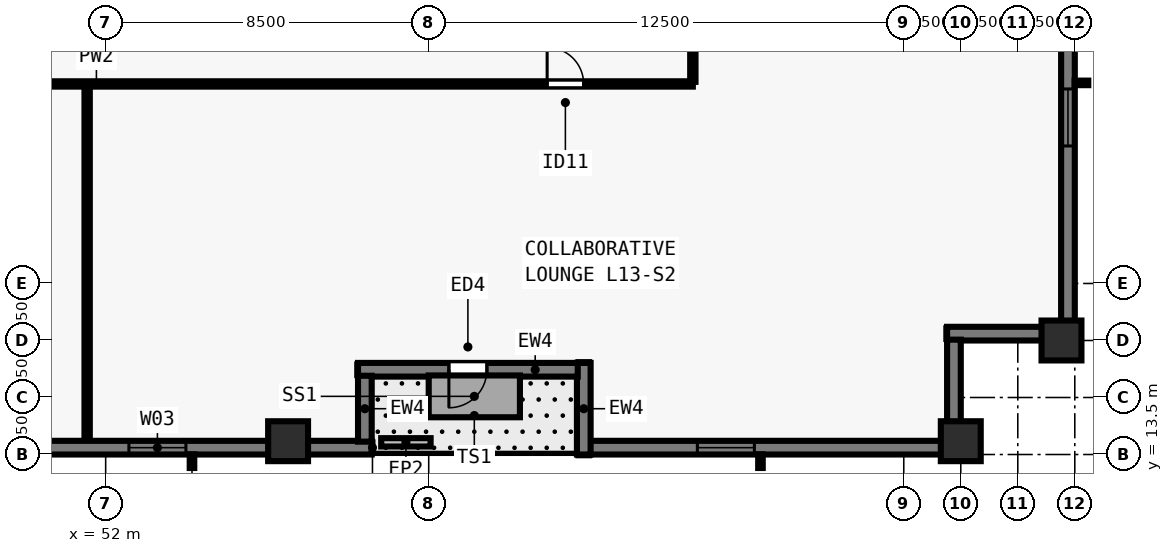
"""IFC4 building model, lengths in metres.
Left out: names, types, materials, properties, quantities, classifications, styles, units other than length and angle.
Written with IfcOpenShell. Run it as: python <this file> out.ifc"""

import sys

from ifc_helpers import new_model, si_unit, direction, frame, frame_2d, origin, origin_2d, place, context, subcontext, project, spatial, rectangle, extrude, element, fill, save


model = new_model("IFC4")
c1 = context("Model", 3, precision=1e-05, world=origin(), true_north=direction((0.0, 1.0)))
c2 = subcontext(c1, "Body", "Model", "MODEL_VIEW")
j1 = project(units=[si_unit("LENGTHUNIT", "METRE"), si_unit("PLANEANGLEUNIT", "RADIAN")], contexts=[c1])
p1 = place(None, origin())
s1 = spatial("IfcSite", under=j1, at=p1, CompositionType="ELEMENT")
p2 = place(p1, origin())
s2 = spatial("IfcBuilding", under=s1, at=p2, CompositionType="ELEMENT")
p3 = place(p2, frame((0.0, 0.0, 51.5)))
s3 = spatial("IfcBuildingStorey", under=s2, at=p3, CompositionType="ELEMENT", Elevation=51.5)
for number, where, z_axis, x_axis in (
    (1, (56.8, 13.85, 0.0), (0.0, 0.0, 1.0), (1.0, 0.0, 0.0)),
    (2, (74.5, 13.85, 0.0), (0.0, 0.0, 1.0), (1.0, 0.0, 0.0)),
    (3, (77.15, 16.5, 0.0), (0.0, 0.0, 1.0), (0.0, 1.0, 0.0)),
):
    element("IfcColumn", number, at=place(p3, frame(where, z_axis=z_axis, x_axis=x_axis)), inside=s3, PredefinedType="COLUMN", context=c2, shape_type="SweptSolid", body=[
        extrude(rectangle(XDim=1.05, YDim=1.05, at=origin_2d()), origin(), (0.0, 0.0, 1.0), 3.5),
    ])
p4 = place(p3, frame((59.0, 13.68, 0.0), z_axis=(0.0, 0.0, 1.0), x_axis=(-1.0, 0.0, 0.0)))
e4 = element("IfcWall", 4, at=p4, inside=s3, PredefinedType="SOLIDWALL", context=c2, shape_type="SweptSolid", body=[
    extrude(rectangle(XDim=29.162, YDim=0.36, at=frame_2d((14.581, 0.0))), origin(), (0.0, 0.0, 1.0), 3.28),
])
p5 = place(p4, frame((4.888, 0.0, 0.8)))
e5 = element("IfcOpeningElement", 5, at=p5, cuts=e4, PredefinedType="OPENING", context=c2, shape_type="SweptSolid", body=[
    extrude(rectangle(XDim=1.5, YDim=1.544, at=frame_2d((0.75, 0.772))), frame((0.0, 0.19, 0.0), z_axis=(0.0, -1.0, 0.0), x_axis=(1.0, 0.0, 0.0)), (0.0, 0.0, 1.0), 0.38),
])
p6 = place(p4, frame((8.615, 0.0, 0.8)))
e6 = element("IfcOpeningElement", 6, at=p6, cuts=e4, PredefinedType="OPENING", context=c2, shape_type="SweptSolid", body=[
    extrude(rectangle(XDim=1.2, YDim=1.544, at=frame_2d((0.6, 0.772))), frame((0.0, 0.19, 0.0), z_axis=(0.0, -1.0, 0.0), x_axis=(1.0, 0.0, 0.0)), (0.0, 0.0, 1.0), 0.38),
])
p7 = place(p4, frame((12.893, 0.0, 0.8)))
e7 = element("IfcOpeningElement", 7, at=p7, cuts=e4, PredefinedType="OPENING", context=c2, shape_type="SweptSolid", body=[
    extrude(rectangle(XDim=1.5, YDim=1.544, at=frame_2d((0.75, 0.772))), frame((0.0, 0.19, 0.0), z_axis=(0.0, -1.0, 0.0), x_axis=(1.0, 0.0, 0.0)), (0.0, 0.0, 1.0), 0.38),
])
p8 = place(p4, frame((15.77, 0.0, 0.8)))
e8 = element("IfcOpeningElement", 8, at=p8, cuts=e4, PredefinedType="OPENING", context=c2, shape_type="SweptSolid", body=[
    extrude(rectangle(XDim=1.2, YDim=1.544, at=frame_2d((0.6, 0.772))), frame((0.0, 0.19, 0.0), z_axis=(0.0, -1.0, 0.0), x_axis=(1.0, 0.0, 0.0)), (0.0, 0.0, 1.0), 0.38),
])
p9 = place(p4, frame((19.197, 0.0, 0.8)))
e9 = element("IfcOpeningElement", 9, at=p9, cuts=e4, PredefinedType="OPENING", context=c2, shape_type="SweptSolid", body=[
    extrude(rectangle(XDim=1.5, YDim=1.544, at=frame_2d((0.75, 0.772))), frame((0.0, 0.19, 0.0), z_axis=(0.0, -1.0, 0.0), x_axis=(1.0, 0.0, 0.0)), (0.0, 0.0, 1.0), 0.38),
])
p10 = place(p4, frame((22.924, 0.0, 0.8)))
e10 = element("IfcOpeningElement", 10, at=p10, cuts=e4, PredefinedType="OPENING", context=c2, shape_type="SweptSolid", body=[
    extrude(rectangle(XDim=1.2, YDim=1.544, at=frame_2d((0.6, 0.772))), frame((0.0, 0.19, 0.0), z_axis=(0.0, -1.0, 0.0), x_axis=(1.0, 0.0, 0.0)), (0.0, 0.0, 1.0), 0.38),
])
p11 = place(p3, frame((77.32, 61.5, 0.0), z_axis=(0.0, 0.0, 1.0), x_axis=(0.0, -1.0, 0.0)))
e11 = element("IfcWall", 11, at=p11, inside=s3, PredefinedType="SOLIDWALL", context=c2, shape_type="SweptSolid", body=[
    extrude(rectangle(XDim=44.662, YDim=0.36, at=frame_2d((22.331, 0.0))), origin(), (0.0, 0.0, 1.0), 3.28),
])
p12 = place(p11, frame((4.78, 0.0, 0.8)))
e12 = element("IfcOpeningElement", 12, at=p12, cuts=e11, PredefinedType="OPENING", context=c2, shape_type="SweptSolid", body=[
    extrude(rectangle(XDim=1.5, YDim=1.544, at=frame_2d((0.75, 0.772))), frame((0.0, 0.19, 0.0), z_axis=(0.0, -1.0, 0.0), x_axis=(1.0, 0.0, 0.0)), (0.0, 0.0, 1.0), 0.38),
])
p13 = place(p11, frame((8.29, 0.0, 0.8)))
e13 = element("IfcOpeningElement", 13, at=p13, cuts=e11, PredefinedType="OPENING", context=c2, shape_type="SweptSolid", body=[
    extrude(rectangle(XDim=1.2, YDim=1.544, at=frame_2d((0.6, 0.772))), frame((0.0, 0.19, 0.0), z_axis=(0.0, -1.0, 0.0), x_axis=(1.0, 0.0, 0.0)), (0.0, 0.0, 1.0), 0.38),
])
p14 = place(p11, frame((11.5, 0.0, 0.8)))
e14 = element("IfcOpeningElement", 14, at=p14, cuts=e11, PredefinedType="OPENING", context=c2, shape_type="SweptSolid", body=[
    extrude(rectangle(XDim=1.5, YDim=1.544, at=frame_2d((0.75, 0.772))), frame((0.0, 0.19, 0.0), z_axis=(0.0, -1.0, 0.0), x_axis=(1.0, 0.0, 0.0)), (0.0, 0.0, 1.0), 0.38),
])
p15 = place(p11, frame((15.01, 0.0, 0.8)))
e15 = element("IfcOpeningElement", 15, at=p15, cuts=e11, PredefinedType="OPENING", context=c2, shape_type="SweptSolid", body=[
    extrude(rectangle(XDim=1.2, YDim=1.544, at=frame_2d((0.6, 0.772))), frame((0.0, 0.19, 0.0), z_axis=(0.0, -1.0, 0.0), x_axis=(1.0, 0.0, 0.0)), (0.0, 0.0, 1.0), 0.38),
])
p16 = place(p11, frame((18.671, 0.0, 0.8)))
e16 = element("IfcOpeningElement", 16, at=p16, cuts=e11, PredefinedType="OPENING", context=c2, shape_type="SweptSolid", body=[
    extrude(rectangle(XDim=1.5, YDim=1.544, at=frame_2d((0.75, 0.772))), frame((0.0, 0.19, 0.0), z_axis=(0.0, -1.0, 0.0), x_axis=(1.0, 0.0, 0.0)), (0.0, 0.0, 1.0), 0.38),
])
p17 = place(p11, frame((22.581, 0.0, 0.8)))
e17 = element("IfcOpeningElement", 17, at=p17, cuts=e11, PredefinedType="OPENING", context=c2, shape_type="SweptSolid", body=[
    extrude(rectangle(XDim=1.2, YDim=1.544, at=frame_2d((0.6, 0.772))), frame((0.0, 0.19, 0.0), z_axis=(0.0, -1.0, 0.0), x_axis=(1.0, 0.0, 0.0)), (0.0, 0.0, 1.0), 0.38),
])
p18 = place(p11, frame((24.941, 0.0, 0.8)))
e18 = element("IfcOpeningElement", 18, at=p18, cuts=e11, PredefinedType="OPENING", context=c2, shape_type="SweptSolid", body=[
    extrude(rectangle(XDim=1.5, YDim=1.544, at=frame_2d((0.75, 0.772))), frame((0.0, 0.19, 0.0), z_axis=(0.0, -1.0, 0.0), x_axis=(1.0, 0.0, 0.0)), (0.0, 0.0, 1.0), 0.38),
])
p19 = place(p11, frame((28.451, 0.0, 0.8)))
e19 = element("IfcOpeningElement", 19, at=p19, cuts=e11, PredefinedType="OPENING", context=c2, shape_type="SweptSolid", body=[
    extrude(rectangle(XDim=1.2, YDim=1.544, at=frame_2d((0.6, 0.772))), frame((0.0, 0.19, 0.0), z_axis=(0.0, -1.0, 0.0), x_axis=(1.0, 0.0, 0.0)), (0.0, 0.0, 1.0), 0.38),
])
p20 = place(p11, frame((31.662, 0.0, 0.8)))
e20 = element("IfcOpeningElement", 20, at=p20, cuts=e11, PredefinedType="OPENING", context=c2, shape_type="SweptSolid", body=[
    extrude(rectangle(XDim=1.5, YDim=1.544, at=frame_2d((0.75, 0.772))), frame((0.0, 0.19, 0.0), z_axis=(0.0, -1.0, 0.0), x_axis=(1.0, 0.0, 0.0)), (0.0, 0.0, 1.0), 0.38),
])
p21 = place(p11, frame((35.172, 0.0, 0.8)))
e21 = element("IfcOpeningElement", 21, at=p21, cuts=e11, PredefinedType="OPENING", context=c2, shape_type="SweptSolid", body=[
    extrude(rectangle(XDim=1.2, YDim=1.544, at=frame_2d((0.6, 0.772))), frame((0.0, 0.19, 0.0), z_axis=(0.0, -1.0, 0.0), x_axis=(1.0, 0.0, 0.0)), (0.0, 0.0, 1.0), 0.38),
])
p22 = place(p11, frame((38.382, 0.0, 0.8)))
e22 = element("IfcOpeningElement", 22, at=p22, cuts=e11, PredefinedType="OPENING", context=c2, shape_type="SweptSolid", body=[
    extrude(rectangle(XDim=1.5, YDim=1.544, at=frame_2d((0.75, 0.772))), frame((0.0, 0.19, 0.0), z_axis=(0.0, -1.0, 0.0), x_axis=(1.0, 0.0, 0.0)), (0.0, 0.0, 1.0), 0.38),
])
p23 = place(p3, frame((77.5, 16.68, 0.0), z_axis=(0.0, 0.0, 1.0), x_axis=(-1.0, 0.0, 0.0)))
e23 = element("IfcWall", 23, at=p23, inside=s3, PredefinedType="SOLIDWALL", context=c2, shape_type="SweptSolid", body=[
    extrude(rectangle(XDim=3.36, YDim=0.36, at=frame_2d((1.68, 0.0))), origin(), (0.0, 0.0, 1.0), 3.28),
])
p24 = place(p3, frame((74.32, 16.522, 0.0), z_axis=(0.0, 0.0, 1.0), x_axis=(0.0, -1.0, 0.0)))
e24 = element("IfcWall", 24, at=p24, inside=s3, PredefinedType="SOLIDWALL", context=c2, shape_type="SweptSolid", body=[
    extrude(rectangle(XDim=2.684, YDim=0.36, at=frame_2d((1.342, 0.0))), origin(), (0.0, 0.0, 1.0), 3.28),
])
p25 = place(p3, frame((74.5, 13.68, 0.0), z_axis=(0.0, 0.0, 1.0), x_axis=(-1.0, 0.0, 0.0)))
e25 = element("IfcWall", 25, at=p25, inside=s3, PredefinedType="SOLIDWALL", context=c2, shape_type="SweptSolid", body=[
    extrude(rectangle(XDim=9.762, YDim=0.36, at=frame_2d((4.881, 0.0))), origin(), (0.0, 0.0, 1.0), 3.28),
])
p26 = place(p25, frame((5.431, 0.0, 0.8)))
e26 = element("IfcOpeningElement", 26, at=p26, cuts=e25, PredefinedType="OPENING", context=c2, shape_type="SweptSolid", body=[
    extrude(rectangle(XDim=1.5, YDim=1.544, at=frame_2d((0.75, 0.772))), frame((0.0, 0.19, 0.0), z_axis=(0.0, -1.0, 0.0), x_axis=(1.0, 0.0, 0.0)), (0.0, 0.0, 1.0), 0.38),
])
p27 = place(p3, frame((64.58, 13.5, 0.0), z_axis=(0.0, 0.0, 1.0), x_axis=(0.0, 1.0, 0.0)))
e27 = element("IfcWall", 27, at=p27, inside=s3, PredefinedType="SOLIDWALL", context=c2, shape_type="SweptSolid", body=[
    extrude(rectangle(XDim=2.41, YDim=0.36, at=frame_2d((1.205, 0.0))), origin(), (0.0, 0.0, 1.0), 3.28),
])
p28 = place(p3, frame((64.422, 15.73, 0.0), z_axis=(0.0, 0.0, 1.0), x_axis=(-1.0, 0.0, 0.0)))
e28 = element("IfcWall", 28, at=p28, inside=s3, PredefinedType="SOLIDWALL", context=c2, shape_type="SweptSolid", body=[
    extrude(rectangle(XDim=5.782, YDim=0.36, at=frame_2d((2.891, 0.0))), origin(), (0.0, 0.0, 1.0), 3.28),
])
p29 = place(p28, frame((2.391, 0.0, 0.0)))
e29 = element("IfcOpeningElement", 29, at=p29, cuts=e28, PredefinedType="OPENING", context=c2, shape_type="SweptSolid", body=[
    extrude(rectangle(XDim=1.0, YDim=2.15, at=frame_2d((0.5, 1.075))), frame((0.0, 0.19, 0.0), z_axis=(0.0, -1.0, 0.0), x_axis=(1.0, 0.0, 0.0)), (0.0, 0.0, 1.0), 0.38),
])
p30 = place(p3, frame((58.82, 15.572, 0.0), z_axis=(0.0, 0.0, 1.0), x_axis=(0.0, -1.0, 0.0)))
e30 = element("IfcWall", 30, at=p30, inside=s3, PredefinedType="SOLIDWALL", context=c2, shape_type="SweptSolid", body=[
    extrude(rectangle(XDim=1.734, YDim=0.36, at=frame_2d((0.867, 0.0))), origin(), (0.0, 0.0, 1.0), 3.28),
])
p31 = place(p3, frame((59.25, 13.82, 0.0), z_axis=(0.0, 0.0, 1.0), x_axis=(1.0, 0.0, 0.0)))
e31 = element("IfcWall", 31, at=p31, inside=s3, PredefinedType="PARAPET", context=c2, shape_type="SweptSolid", body=[
    extrude(rectangle(XDim=1.3, YDim=0.22, at=frame_2d((0.65, 0.0))), origin(), (0.0, 0.0, 1.0), 0.55),
])
p32 = place(p3, frame((36.55, 23.25, 0.0), z_axis=(0.0, 0.0, 1.0), x_axis=(1.0, 0.0, 0.0)))
e32 = element("IfcWall", 32, at=p32, inside=s3, PredefinedType="PARTITIONING", context=c2, shape_type="SweptSolid", body=[
    extrude(rectangle(XDim=30.9, YDim=0.14, at=frame_2d((15.45, 0.0))), origin(), (0.0, 0.0, 1.0), 3.28),
])
p33 = place(p32, frame((2.386, 0.0, 0.0)))
e33 = element("IfcOpeningElement", 33, at=p33, cuts=e32, PredefinedType="OPENING", context=c2, shape_type="SweptSolid", body=[
    extrude(rectangle(XDim=0.96, YDim=2.12, at=frame_2d((0.48, 1.06))), frame((0.0, 0.08, 0.0), z_axis=(0.0, -1.0, 0.0), x_axis=(1.0, 0.0, 0.0)), (0.0, 0.0, 1.0), 0.16),
])
p34 = place(p32, frame((27.066, 0.0, 0.0)))
e34 = element("IfcOpeningElement", 34, at=p34, cuts=e32, PredefinedType="OPENING", context=c2, shape_type="SweptSolid", body=[
    extrude(rectangle(XDim=0.96, YDim=2.12, at=frame_2d((0.48, 1.06))), frame((0.0, 0.08, 0.0), z_axis=(0.0, -1.0, 0.0), x_axis=(1.0, 0.0, 0.0)), (0.0, 0.0, 1.0), 0.16),
])
p35 = place(p3, frame((67.45, 23.305, 0.0), z_axis=(0.0, 0.0, 1.0), x_axis=(0.0, 1.0, 0.0)))
e35 = element("IfcWall", 35, at=p35, inside=s3, PredefinedType="PARTITIONING", context=c2, shape_type="SweptSolid", body=[
    extrude(rectangle(XDim=31.39, YDim=0.14, at=frame_2d((15.695, 0.0))), origin(), (0.0, 0.0, 1.0), 3.28),
])
p36 = place(p35, frame((7.561, 0.0, 0.0)))
e36 = element("IfcOpeningElement", 36, at=p36, cuts=e35, PredefinedType="OPENING", context=c2, shape_type="SweptSolid", body=[
    extrude(rectangle(XDim=0.96, YDim=2.12, at=frame_2d((0.48, 1.06))), frame((0.0, 0.08, 0.0), z_axis=(0.0, -1.0, 0.0), x_axis=(1.0, 0.0, 0.0)), (0.0, 0.0, 1.0), 0.16),
])
p37 = place(p35, frame((23.211, 0.0, 0.0)))
e37 = element("IfcOpeningElement", 37, at=p37, cuts=e35, PredefinedType="OPENING", context=c2, shape_type="SweptSolid", body=[
    extrude(rectangle(XDim=0.96, YDim=2.12, at=frame_2d((0.48, 1.06))), frame((0.0, 0.08, 0.0), z_axis=(0.0, -1.0, 0.0), x_axis=(1.0, 0.0, 0.0)), (0.0, 0.0, 1.0), 0.16),
])
p38 = place(p3, frame((51.512, 13.92, 0.0), z_axis=(0.0, 0.0, 1.0), x_axis=(0.0, 1.0, 0.0)))
e38 = element("IfcWall", 38, at=p38, inside=s3, PredefinedType="PARTITIONING", context=c2, shape_type="SweptSolid", body=[
    extrude(rectangle(XDim=9.23, YDim=0.14, at=frame_2d((4.615, 0.0))), origin(), (0.0, 0.0, 1.0), 2.849),
])
p39 = place(p5, origin())
e39 = element("IfcWindow", 39, at=p39, inside=s3, PartitioningType="SINGLE_PANEL", PredefinedType="WINDOW", context=c2, shape_type="SweptSolid", body=[
    extrude(rectangle(XDim=1.5, YDim=1.544, at=frame_2d((0.75, 0.772))), frame((0.0, -0.05, 0.0), z_axis=(0.0, -1.0, 0.0), x_axis=(1.0, 0.0, 0.0)), (0.0, 0.0, 1.0), 0.06),
])
fill(e5, e39)
p40 = place(p22, origin())
e40 = element("IfcWindow", 40, at=p40, inside=s3, PartitioningType="SINGLE_PANEL", PredefinedType="WINDOW", context=c2, shape_type="SweptSolid", body=[
    extrude(rectangle(XDim=1.5, YDim=1.544, at=frame_2d((0.75, 0.772))), frame((0.0, -0.05, 0.0), z_axis=(0.0, -1.0, 0.0), x_axis=(1.0, 0.0, 0.0)), (0.0, 0.0, 1.0), 0.06),
])
fill(e22, e40)
p41 = place(p26, origin())
e41 = element("IfcWindow", 41, at=p41, inside=s3, PartitioningType="SINGLE_PANEL", PredefinedType="WINDOW", context=c2, shape_type="SweptSolid", body=[
    extrude(rectangle(XDim=1.5, YDim=1.544, at=frame_2d((0.75, 0.772))), frame((0.0, -0.05, 0.0), z_axis=(0.0, -1.0, 0.0), x_axis=(1.0, 0.0, 0.0)), (0.0, 0.0, 1.0), 0.06),
])
fill(e26, e41)
p42 = place(p29, origin())
e42 = element("IfcDoor", 42, at=p42, inside=s3, OperationType="SINGLE_SWING_RIGHT", PredefinedType="DOOR", context=c2, shape_type="SweptSolid", body=[
    extrude(rectangle(XDim=1.0, YDim=2.15, at=frame_2d((0.5, 1.075))), frame((0.0, 0.025, 0.0), z_axis=(0.0, -1.0, 0.0), x_axis=(1.0, 0.0, 0.0)), (0.0, 0.0, 1.0), 0.05),
])
fill(e29, e42)
p43 = place(p34, origin())
e43 = element("IfcDoor", 43, at=p43, inside=s3, OperationType="SINGLE_SWING_LEFT", PredefinedType="DOOR", context=c2, shape_type="SweptSolid", body=[
    extrude(rectangle(XDim=0.96, YDim=2.12, at=frame_2d((0.48, 1.06))), frame((0.0, 0.025, 0.0), z_axis=(0.0, -1.0, 0.0), x_axis=(1.0, 0.0, 0.0)), (0.0, 0.0, 1.0), 0.05),
])
fill(e34, e43)
save(model, sys.argv[1])
